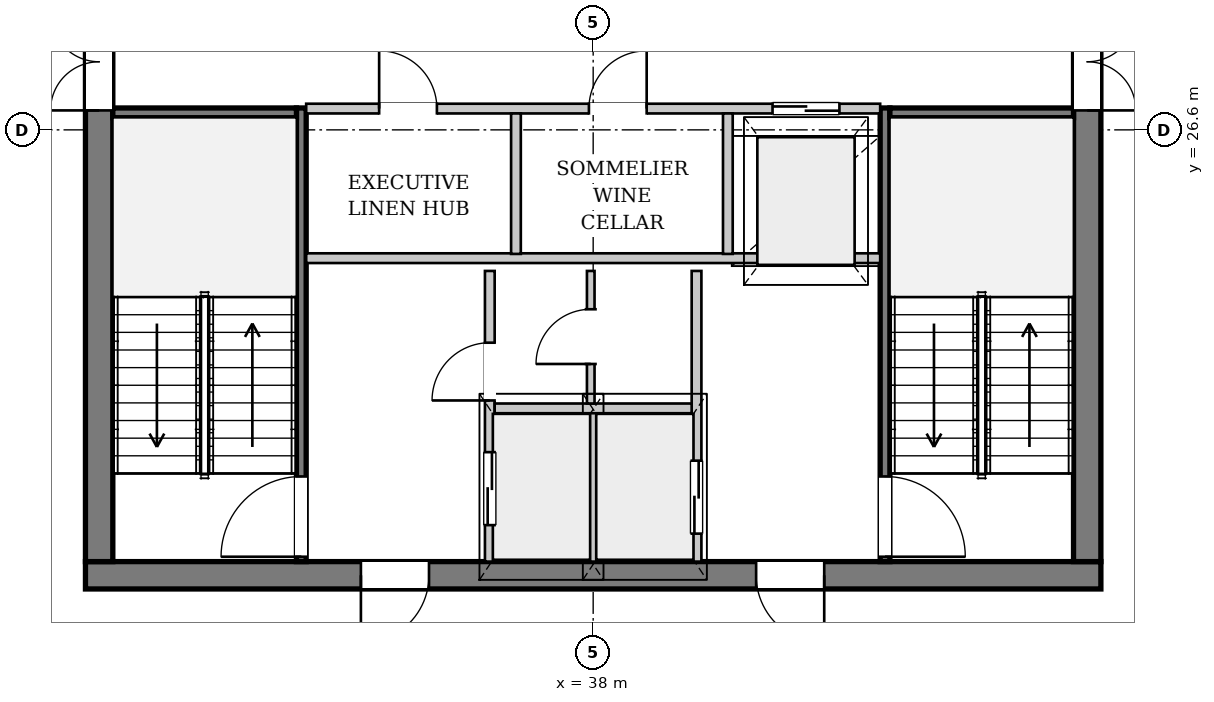
"""IFC4 building model, lengths in metres.
Left out: names, types, materials, properties, quantities, classifications, styles, units other than length and angle.
Written with IfcOpenShell. Run it as: python <this file> out.ifc"""

import sys

from ifc_helpers import new_model, si_unit, direction, frame, frame_2d, origin, place, context, subcontext, project, spatial, rectangle, extrude, source, transform, mapped, element, fill, save


model = new_model("IFC4")
c1 = context("Model", 3, precision=1e-05, world=origin(), true_north=direction((0.0, 1.0)))
c2 = subcontext(c1, "Body", "Model", "MODEL_VIEW")
j1 = project(units=[si_unit("LENGTHUNIT", "METRE"), si_unit("PLANEANGLEUNIT", "RADIAN")], contexts=[c1])
p1 = place(None, origin())
s1 = spatial("IfcSite", under=j1, at=p1, CompositionType="ELEMENT")
p2 = place(p1, origin())
s2 = spatial("IfcBuilding", under=s1, at=p2, CompositionType="ELEMENT")
p3 = place(p2, frame((0.0, 0.0, 248.9)))
s3 = spatial("IfcBuildingStorey", under=s2, at=p3, CompositionType="ELEMENT", Elevation=248.9)
p4 = place(p3, frame((52.261, 25.755, 0.0), z_axis=(0.0, 0.0, 1.0), x_axis=(-0.333397626213, -0.94278630815, 0.0)))
e1 = element("IfcWall", 1, at=p4, inside=s3, PredefinedType="SOLIDWALL", context=c2, shape_type="SweptSolid", body=[
    extrude(rectangle(XDim=22.663, YDim=0.32, at=frame_2d((11.332, 0.0))), origin(), (0.0, 0.0, 1.0), 2.872),
])
p5 = place(p4, frame((6.502, 0.0, 0.0)))
e2 = element("IfcOpeningElement", 2, at=p5, cuts=e1, PredefinedType="OPENING", context=c2, shape_type="SweptSolid", body=[
    extrude(rectangle(XDim=1.5, YDim=2.3, at=frame_2d((0.75, 1.15))), frame((0.0, 0.17, 0.0), z_axis=(0.0, -1.0, 0.0), x_axis=(1.0, 0.0, 0.0)), (0.0, 0.0, 1.0), 0.34),
])
p6 = place(p4, frame((15.471, 0.0, 0.402)))
e3 = element("IfcOpeningElement", 3, at=p6, cuts=e1, PredefinedType="OPENING", context=c2, shape_type="SweptSolid", body=[
    extrude(rectangle(XDim=2.6, YDim=2.35, at=frame_2d((1.3, 1.175))), frame((0.0, 0.17, 0.0), z_axis=(0.0, -1.0, 0.0), x_axis=(1.0, 0.0, 0.0)), (0.0, 0.0, 1.0), 0.34),
])
p7 = place(p3, frame((46.35, 19.275, 0.0), z_axis=(0.0, 0.0, 1.0), x_axis=(-1.0, 0.0, 0.0)))
e4 = element("IfcWall", 4, at=p7, inside=s3, PredefinedType="SHEAR", context=c2, shape_type="SweptSolid", body=[
    extrude(rectangle(XDim=16.7, YDim=0.45, at=frame_2d((8.35, 0.0))), origin(), (0.0, 0.0, 1.0), 3.38),
])
p8 = place(p7, frame((4.55, 0.0, 0.0)))
e5 = element("IfcOpeningElement", 5, at=p8, cuts=e4, PredefinedType="OPENING", context=c2, shape_type="SweptSolid", body=[
    extrude(rectangle(XDim=1.12, YDim=2.25, at=frame_2d((0.56, 1.125))), frame((0.0, 0.235, 0.0), z_axis=(0.0, -1.0, 0.0), x_axis=(1.0, 0.0, 0.0)), (0.0, 0.0, 1.0), 0.47),
])
p9 = place(p7, frame((11.05, 0.0, 0.0)))
e6 = element("IfcOpeningElement", 6, at=p9, cuts=e4, PredefinedType="OPENING", context=c2, shape_type="SweptSolid", body=[
    extrude(rectangle(XDim=1.12, YDim=2.25, at=frame_2d((0.56, 1.125))), frame((0.0, 0.235, 0.0), z_axis=(0.0, -1.0, 0.0), x_axis=(1.0, 0.0, 0.0)), (0.0, 0.0, 1.0), 0.47),
])
p10 = place(p3, frame((29.875, 19.5, 0.0), z_axis=(0.0, 0.0, 1.0), x_axis=(0.0, 1.0, 0.0)))
e7 = element("IfcWall", 7, at=p10, inside=s3, PredefinedType="SHEAR", context=c2, shape_type="SweptSolid", body=[
    extrude(rectangle(XDim=14.2, YDim=0.45, at=frame_2d((7.1, 0.0))), origin(), (0.0, 0.0, 1.0), 3.38),
])
p11 = place(p10, frame((7.42, 0.0, 0.0)))
e8 = element("IfcOpeningElement", 8, at=p11, cuts=e7, PredefinedType="OPENING", context=c2, shape_type="SweptSolid", body=[
    extrude(rectangle(XDim=1.6, YDim=2.2, at=frame_2d((0.8, 1.1))), frame((0.0, 0.235, 0.0), z_axis=(0.0, -1.0, 0.0), x_axis=(1.0, 0.0, 0.0)), (0.0, 0.0, 1.0), 0.47),
])
p12 = place(p3, frame((46.125, 33.7, 0.0), z_axis=(0.0, 0.0, 1.0), x_axis=(0.0, -1.0, 0.0)))
e9 = element("IfcWall", 9, at=p12, inside=s3, PredefinedType="SHEAR", context=c2, shape_type="SweptSolid", body=[
    extrude(rectangle(XDim=14.2, YDim=0.45, at=frame_2d((7.1, 0.0))), origin(), (0.0, 0.0, 1.0), 3.38),
])
p13 = place(p12, frame((5.18, 0.0, 0.0)))
e10 = element("IfcOpeningElement", 10, at=p13, cuts=e9, PredefinedType="OPENING", context=c2, shape_type="SweptSolid", body=[
    extrude(rectangle(XDim=1.6, YDim=2.2, at=frame_2d((0.8, 1.1))), frame((0.0, 0.235, 0.0), z_axis=(0.0, -1.0, 0.0), x_axis=(1.0, 0.0, 0.0)), (0.0, 0.0, 1.0), 0.47),
])
p14 = place(p12, frame((2.05, 0.0, 0.0)))
e11 = element("IfcOpeningElement", 11, at=p14, cuts=e9, PredefinedType="OPENING", context=c2, shape_type="SweptSolid", body=[
    extrude(rectangle(XDim=0.95, YDim=2.1, at=frame_2d((0.475, 1.05))), frame((0.0, 0.235, 0.0), z_axis=(0.0, -1.0, 0.0), x_axis=(1.0, 0.0, 0.0)), (0.0, 0.0, 1.0), 0.47),
])
p15 = place(p3, frame((33.2, 19.5, 0.0), z_axis=(0.0, 0.0, 1.0), x_axis=(0.0, 1.0, 0.0)))
e12 = element("IfcWall", 12, at=p15, inside=s3, PredefinedType="PARTITIONING", context=c2, shape_type="SweptSolid", body=[
    extrude(rectangle(XDim=7.46, YDim=0.16, at=frame_2d((3.73, 0.0))), origin(), (0.0, 0.0, 1.0), 3.38),
])
p16 = place(p15, frame((0.08, 0.0, 0.0)))
e13 = element("IfcOpeningElement", 13, at=p16, cuts=e12, PredefinedType="OPENING", context=c2, shape_type="SweptSolid", body=[
    extrude(rectangle(XDim=1.32, YDim=2.2, at=frame_2d((0.66, 1.1))), frame((0.0, 0.09, 0.0), z_axis=(0.0, -1.0, 0.0), x_axis=(1.0, 0.0, 0.0)), (0.0, 0.0, 1.0), 0.18),
])
p17 = place(p3, frame((30.1, 26.88, 0.0), z_axis=(0.0, 0.0, 1.0), x_axis=(1.0, 0.0, 0.0)))
e14 = element("IfcWall", 14, at=p17, inside=s3, PredefinedType="PARTITIONING", context=c2, shape_type="SweptSolid", body=[
    extrude(rectangle(XDim=3.02, YDim=0.16, at=frame_2d((1.51, 0.0))), origin(), (0.0, 0.0, 1.0), 3.38),
])
p18 = place(p3, frame((42.8, 26.96, 0.0), z_axis=(0.0, 0.0, 1.0), x_axis=(0.0, -1.0, 0.0)))
e15 = element("IfcWall", 15, at=p18, inside=s3, PredefinedType="PARTITIONING", context=c2, shape_type="SweptSolid", body=[
    extrude(rectangle(XDim=7.46, YDim=0.16, at=frame_2d((3.73, 0.0))), origin(), (0.0, 0.0, 1.0), 3.38),
])
p19 = place(p18, frame((6.06, 0.0, 0.0)))
e16 = element("IfcOpeningElement", 16, at=p19, cuts=e15, PredefinedType="OPENING", context=c2, shape_type="SweptSolid", body=[
    extrude(rectangle(XDim=1.32, YDim=2.2, at=frame_2d((0.66, 1.1))), frame((0.0, 0.09, 0.0), z_axis=(0.0, -1.0, 0.0), x_axis=(1.0, 0.0, 0.0)), (0.0, 0.0, 1.0), 0.18),
])
p20 = place(p3, frame((42.88, 26.88, 0.0), z_axis=(0.0, 0.0, 1.0), x_axis=(1.0, 0.0, 0.0)))
e17 = element("IfcWall", 17, at=p20, inside=s3, PredefinedType="PARTITIONING", context=c2, shape_type="SweptSolid", body=[
    extrude(rectangle(XDim=3.02, YDim=0.16, at=frame_2d((1.51, 0.0))), origin(), (0.0, 0.0, 1.0), 3.38),
])
p21 = place(p3, frame((36.3, 19.5, 0.0), z_axis=(0.0, 0.0, 1.0), x_axis=(0.0, 1.0, 0.0)))
e18 = element("IfcWall", 18, at=p21, inside=s3, PredefinedType="PARTITIONING", context=c2, shape_type="SweptSolid", body=[
    extrude(rectangle(XDim=4.78, YDim=0.16, at=frame_2d((2.39, 0.0))), origin(), (0.0, 0.0, 1.0), 3.38),
])
p22 = place(p21, frame((0.6, 0.0, 0.0)))
e19 = element("IfcOpeningElement", 19, at=p22, cuts=e18, PredefinedType="OPENING", context=c2, shape_type="SweptSolid", body=[
    extrude(rectangle(XDim=1.2, YDim=2.2, at=frame_2d((0.6, 1.1))), frame((0.0, 0.09, 0.0), z_axis=(0.0, -1.0, 0.0), x_axis=(1.0, 0.0, 0.0)), (0.0, 0.0, 1.0), 0.18),
])
p23 = place(p21, frame((2.65, 0.0, 0.0)))
e20 = element("IfcOpeningElement", 20, at=p23, cuts=e18, PredefinedType="OPENING", context=c2, shape_type="SweptSolid", body=[
    extrude(rectangle(XDim=0.95, YDim=2.1, at=frame_2d((0.475, 1.05))), frame((0.0, 0.09, 0.0), z_axis=(0.0, -1.0, 0.0), x_axis=(1.0, 0.0, 0.0)), (0.0, 0.0, 1.0), 0.18),
])
p24 = place(p3, frame((39.7, 24.28, 0.0), z_axis=(0.0, 0.0, 1.0), x_axis=(0.0, -1.0, 0.0)))
e21 = element("IfcWall", 21, at=p24, inside=s3, PredefinedType="PARTITIONING", context=c2, shape_type="SweptSolid", body=[
    extrude(rectangle(XDim=4.78, YDim=0.16, at=frame_2d((2.39, 0.0))), origin(), (0.0, 0.0, 1.0), 3.38),
])
p25 = place(p24, frame((3.12, 0.0, 0.0)))
e22 = element("IfcOpeningElement", 22, at=p25, cuts=e21, PredefinedType="OPENING", context=c2, shape_type="SweptSolid", body=[
    extrude(rectangle(XDim=1.2, YDim=2.2, at=frame_2d((0.6, 1.1))), frame((0.0, 0.09, 0.0), z_axis=(0.0, -1.0, 0.0), x_axis=(1.0, 0.0, 0.0)), (0.0, 0.0, 1.0), 0.18),
])
p26 = place(p3, frame((38.0, 19.5, 0.0), z_axis=(0.0, 0.0, 1.0), x_axis=(0.0, 1.0, 0.0)))
e23 = element("IfcWall", 23, at=p26, inside=s3, PredefinedType="PARTITIONING", context=c2, shape_type="SweptSolid", body=[
    extrude(rectangle(XDim=2.46, YDim=0.125, at=frame_2d((1.23, 0.0))), origin(), (0.0, 0.0, 1.0), 3.38),
])
p27 = place(p3, frame((36.38, 22.02, 0.0), z_axis=(0.0, 0.0, 1.0), x_axis=(1.0, 0.0, 0.0)))
e24 = element("IfcWall", 24, at=p27, inside=s3, PredefinedType="PARTITIONING", context=c2, shape_type="SweptSolid", body=[
    extrude(rectangle(XDim=3.24, YDim=0.16, at=frame_2d((1.62, 0.0))), origin(), (0.0, 0.0, 1.0), 3.38),
])
p28 = place(p3, frame((33.28, 24.49, 0.0), z_axis=(0.0, 0.0, 1.0), x_axis=(1.0, 0.0, 0.0)))
e25 = element("IfcWall", 25, at=p28, inside=s3, PredefinedType="PARTITIONING", context=c2, shape_type="SweptSolid", body=[
    extrude(rectangle(XDim=9.44, YDim=0.16, at=frame_2d((4.72, 0.0))), origin(), (0.0, 0.0, 1.0), 3.38),
])
p29 = place(p3, frame((37.96, 22.1, 0.0), z_axis=(0.0, 0.0, 1.0), x_axis=(0.0, 1.0, 0.0)))
e26 = element("IfcWall", 26, at=p29, inside=s3, PredefinedType="PARTITIONING", context=c2, shape_type="SweptSolid", body=[
    extrude(rectangle(XDim=2.18, YDim=0.125, at=frame_2d((1.09, 0.0))), origin(), (0.0, 0.0, 1.0), 3.38),
])
p30 = place(p29, frame((0.65, 0.0, 0.0)))
e27 = element("IfcOpeningElement", 27, at=p30, cuts=e26, PredefinedType="OPENING", context=c2, shape_type="SweptSolid", body=[
    extrude(rectangle(XDim=0.9, YDim=2.1, at=frame_2d((0.45, 1.05))), frame((0.0, 0.073, 0.0), z_axis=(0.0, -1.0, 0.0), x_axis=(1.0, 0.0, 0.0)), (0.0, 0.0, 1.0), 0.145),
])
p31 = place(p3, frame((33.28, 26.95, 0.0), z_axis=(0.0, 0.0, 1.0), x_axis=(1.0, 0.0, 0.0)))
e28 = element("IfcWall", 28, at=p31, inside=s3, PredefinedType="PARTITIONING", context=c2, shape_type="SweptSolid", body=[
    extrude(rectangle(XDim=9.44, YDim=0.16, at=frame_2d((4.72, 0.0))), origin(), (0.0, 0.0, 1.0), 3.38),
])
p32 = place(p31, frame((1.2, 0.0, 0.0)))
e29 = element("IfcOpeningElement", 29, at=p32, cuts=e28, PredefinedType="OPENING", context=c2, shape_type="SweptSolid", body=[
    extrude(rectangle(XDim=0.95, YDim=2.1, at=frame_2d((0.475, 1.05))), frame((0.0, 0.09, 0.0), z_axis=(0.0, -1.0, 0.0), x_axis=(1.0, 0.0, 0.0)), (0.0, 0.0, 1.0), 0.18),
])
p33 = place(p31, frame((4.65, 0.0, 0.0)))
e30 = element("IfcOpeningElement", 30, at=p33, cuts=e28, PredefinedType="OPENING", context=c2, shape_type="SweptSolid", body=[
    extrude(rectangle(XDim=0.95, YDim=2.1, at=frame_2d((0.475, 1.05))), frame((0.0, 0.09, 0.0), z_axis=(0.0, -1.0, 0.0), x_axis=(1.0, 0.0, 0.0)), (0.0, 0.0, 1.0), 0.18),
])
p34 = place(p31, frame((7.67, 0.0, 0.0)))
e31 = element("IfcOpeningElement", 31, at=p34, cuts=e28, PredefinedType="OPENING", context=c2, shape_type="SweptSolid", body=[
    extrude(rectangle(XDim=1.1, YDim=2.2, at=frame_2d((0.55, 1.1))), frame((0.0, 0.09, 0.0), z_axis=(0.0, -1.0, 0.0), x_axis=(1.0, 0.0, 0.0)), (0.0, 0.0, 1.0), 0.18),
])
for number, where, z_axis, x_axis in (
    (32, (36.73, 24.56, 0.0), (0.0, 0.0, 1.0), (0.0, 1.0, 0.0)),
    (33, (40.215, 24.56, 0.0), (0.0, 0.0, 1.0), (0.0, 1.0, 0.0)),
):
    element("IfcWall", number, at=place(p3, frame(where, z_axis=z_axis, x_axis=x_axis)), inside=s3, PredefinedType="PARTITIONING", context=c2, shape_type="SweptSolid", body=[
        extrude(rectangle(XDim=2.31, YDim=0.16, at=frame_2d((1.155, 0.0))), origin(), (0.0, 0.0, 1.0), 3.38),
    ])
m1 = source(origin(), c2, "Body", "SweptSolid", [
    extrude(rectangle(XDim=1.12, YDim=2.25, at=frame_2d((0.56, 1.125))), frame((0.0, 0.025, 0.0), z_axis=(0.0, -1.0, 0.0), x_axis=(1.0, 0.0, 0.0)), (0.0, 0.0, 1.0), 0.05),
])
p35 = place(p8, origin())
e34 = element("IfcDoor", 34, at=p35, inside=s3, OperationType="SINGLE_SWING_LEFT", PredefinedType="DOOR", context=c2, shape_type="MappedRepresentation", body=[
    mapped(m1, transform((0.0, 0.0, 0.0), x_axis=(1.0, 0.0, 0.0), y_axis=(0.0, 1.0, 0.0), z_axis=(0.0, 0.0, 1.0), scale=1.0)),
])
fill(e5, e34)
p36 = place(p9, origin())
e35 = element("IfcDoor", 35, at=p36, inside=s3, OperationType="SINGLE_SWING_RIGHT", PredefinedType="DOOR", context=c2, shape_type="MappedRepresentation", body=[
    mapped(m1, transform((0.0, 0.0, 0.0), x_axis=(1.0, 0.0, 0.0), y_axis=(0.0, 1.0, 0.0), z_axis=(0.0, 0.0, 1.0), scale=1.0)),
])
fill(e6, e35)
m2 = source(origin(), c2, "Body", "SweptSolid", [
    extrude(rectangle(XDim=1.6, YDim=2.2, at=frame_2d((0.8, 1.1))), frame((0.0, 0.025, 0.0), z_axis=(0.0, -1.0, 0.0), x_axis=(1.0, 0.0, 0.0)), (0.0, 0.0, 1.0), 0.05),
])
p37 = place(p11, origin())
e36 = element("IfcDoor", 36, at=p37, inside=s3, OperationType="DOUBLE_DOOR_SINGLE_SWING", PredefinedType="DOOR", context=c2, shape_type="MappedRepresentation", body=[
    mapped(m2, transform((0.0, 0.0, 0.0), x_axis=(1.0, 0.0, 0.0), y_axis=(0.0, 1.0, 0.0), z_axis=(0.0, 0.0, 1.0), scale=1.0)),
])
fill(e8, e36)
p38 = place(p13, origin())
e37 = element("IfcDoor", 37, at=p38, inside=s3, OperationType="DOUBLE_DOOR_SINGLE_SWING", PredefinedType="DOOR", context=c2, shape_type="MappedRepresentation", body=[
    mapped(m2, transform((0.0, 0.0, 0.0), x_axis=(1.0, 0.0, 0.0), y_axis=(0.0, 1.0, 0.0), z_axis=(0.0, 0.0, 1.0), scale=1.0)),
])
fill(e10, e37)
m3 = source(origin(), c2, "Body", "SweptSolid", [
    extrude(rectangle(XDim=1.32, YDim=2.2, at=frame_2d((0.66, 1.1))), frame((0.0, 0.025, 0.0), z_axis=(0.0, -1.0, 0.0), x_axis=(1.0, 0.0, 0.0)), (0.0, 0.0, 1.0), 0.05),
])
p39 = place(p16, origin())
e38 = element("IfcDoor", 38, at=p39, inside=s3, OperationType="SINGLE_SWING_LEFT", PredefinedType="DOOR", context=c2, shape_type="MappedRepresentation", body=[
    mapped(m3, transform((0.0, 0.0, 0.0), x_axis=(1.0, 0.0, 0.0), y_axis=(0.0, 1.0, 0.0), z_axis=(0.0, 0.0, 1.0), scale=1.0)),
])
fill(e13, e38)
p40 = place(p19, origin())
e39 = element("IfcDoor", 39, at=p40, inside=s3, OperationType="SINGLE_SWING_RIGHT", PredefinedType="DOOR", context=c2, shape_type="MappedRepresentation", body=[
    mapped(m3, transform((0.0, 0.0, 0.0), x_axis=(1.0, 0.0, 0.0), y_axis=(0.0, 1.0, 0.0), z_axis=(0.0, 0.0, 1.0), scale=1.0)),
])
fill(e16, e39)
m4 = source(origin(), c2, "Body", "SweptSolid", [
    extrude(rectangle(XDim=1.2, YDim=2.2, at=frame_2d((0.6, 1.1))), frame((0.0, 0.025, 0.0), z_axis=(0.0, -1.0, 0.0), x_axis=(1.0, 0.0, 0.0)), (0.0, 0.0, 1.0), 0.05),
])
p41 = place(p22, origin())
e40 = element("IfcDoor", 40, at=p41, inside=s3, OperationType="DOUBLE_DOOR_SLIDING", PredefinedType="DOOR", context=c2, shape_type="MappedRepresentation", body=[
    mapped(m4, transform((0.0, 0.0, 0.0), x_axis=(1.0, 0.0, 0.0), y_axis=(0.0, 1.0, 0.0), z_axis=(0.0, 0.0, 1.0), scale=1.0)),
])
fill(e19, e40)
m5 = source(origin(), c2, "Body", "SweptSolid", [
    extrude(rectangle(XDim=0.95, YDim=2.1, at=frame_2d((0.475, 1.05))), frame((0.0, 0.025, 0.0), z_axis=(0.0, -1.0, 0.0), x_axis=(1.0, 0.0, 0.0)), (0.0, 0.0, 1.0), 0.05),
])
p42 = place(p23, origin())
e41 = element("IfcDoor", 41, at=p42, inside=s3, OperationType="SINGLE_SWING_LEFT", PredefinedType="DOOR", context=c2, shape_type="MappedRepresentation", body=[
    mapped(m5, transform((0.0, 0.0, 0.0), x_axis=(1.0, 0.0, 0.0), y_axis=(0.0, 1.0, 0.0), z_axis=(0.0, 0.0, 1.0), scale=1.0)),
])
fill(e20, e41)
m6 = source(origin(), c2, "Body", "SweptSolid", [
    extrude(rectangle(XDim=0.9, YDim=2.1, at=frame_2d((0.45, 1.05))), frame((0.0, 0.025, 0.0), z_axis=(0.0, -1.0, 0.0), x_axis=(1.0, 0.0, 0.0)), (0.0, 0.0, 1.0), 0.05),
])
p43 = place(p30, origin())
e42 = element("IfcDoor", 42, at=p43, inside=s3, OperationType="SINGLE_SWING_LEFT", PredefinedType="DOOR", context=c2, shape_type="MappedRepresentation", body=[
    mapped(m6, transform((0.0, 0.0, 0.0), x_axis=(1.0, 0.0, 0.0), y_axis=(0.0, 1.0, 0.0), z_axis=(0.0, 0.0, 1.0), scale=1.0)),
])
fill(e27, e42)
p44 = place(p25, origin())
e43 = element("IfcDoor", 43, at=p44, inside=s3, OperationType="DOUBLE_DOOR_SLIDING", PredefinedType="DOOR", context=c2, shape_type="MappedRepresentation", body=[
    mapped(m4, transform((0.0, 0.0, 0.0), x_axis=(1.0, 0.0, 0.0), y_axis=(0.0, 1.0, 0.0), z_axis=(0.0, 0.0, 1.0), scale=1.0)),
])
fill(e22, e43)
p45 = place(p32, origin())
e44 = element("IfcDoor", 44, at=p45, inside=s3, OperationType="SINGLE_SWING_LEFT", PredefinedType="DOOR", context=c2, shape_type="MappedRepresentation", body=[
    mapped(m5, transform((0.0, 0.0, 0.0), x_axis=(1.0, 0.0, 0.0), y_axis=(0.0, 1.0, 0.0), z_axis=(0.0, 0.0, 1.0), scale=1.0)),
])
fill(e29, e44)
p46 = place(p33, origin())
e45 = element("IfcDoor", 45, at=p46, inside=s3, OperationType="SINGLE_SWING_RIGHT", PredefinedType="DOOR", context=c2, shape_type="MappedRepresentation", body=[
    mapped(m5, transform((0.0, 0.0, 0.0), x_axis=(1.0, 0.0, 0.0), y_axis=(0.0, 1.0, 0.0), z_axis=(0.0, 0.0, 1.0), scale=1.0)),
])
fill(e30, e45)
m7 = source(origin(), c2, "Body", "SweptSolid", [
    extrude(rectangle(XDim=1.1, YDim=2.2, at=frame_2d((0.55, 1.1))), frame((0.0, 0.025, 0.0), z_axis=(0.0, -1.0, 0.0), x_axis=(1.0, 0.0, 0.0)), (0.0, 0.0, 1.0), 0.05),
])
p47 = place(p34, origin())
e46 = element("IfcDoor", 46, at=p47, inside=s3, OperationType="DOUBLE_DOOR_SLIDING", PredefinedType="DOOR", context=c2, shape_type="MappedRepresentation", body=[
    mapped(m7, transform((0.0, 0.0, 0.0), x_axis=(1.0, 0.0, 0.0), y_axis=(0.0, 1.0, 0.0), z_axis=(0.0, 0.0, 1.0), scale=1.0)),
])
fill(e31, e46)
save(model, sys.argv[1])
